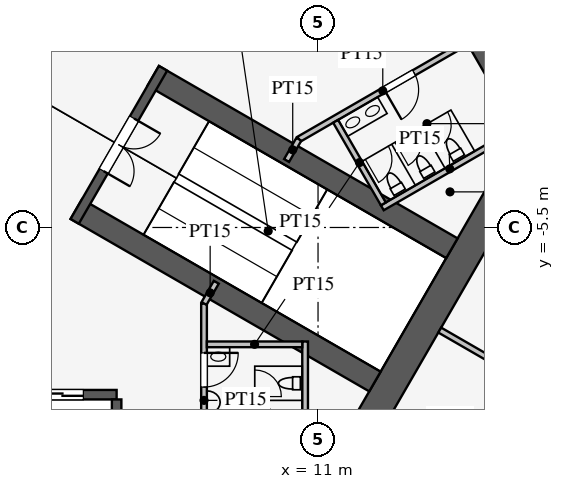
"""IFC4 building model, lengths in metres.
Left out: names, types, materials, properties, quantities, classifications, styles, units other than length and angle.
Written with IfcOpenShell. Run it as: python <this file> out.ifc"""

import sys

from ifc_helpers import new_model, si_unit, direction, frame, frame_2d, origin, place, context, subcontext, project, spatial, rectangle, extrude, element, fill, save


model = new_model("IFC4")
c1 = context("Model", 3, precision=1e-05, world=origin(), true_north=direction((0.0, 1.0)))
c2 = subcontext(c1, "Body", "Model", "MODEL_VIEW")
j1 = project(units=[si_unit("LENGTHUNIT", "METRE"), si_unit("PLANEANGLEUNIT", "RADIAN")], contexts=[c1])
p1 = place(None, origin())
s1 = spatial("IfcSite", under=j1, at=p1, CompositionType="ELEMENT")
p2 = place(p1, origin())
s2 = spatial("IfcBuilding", under=s1, at=p2, CompositionType="ELEMENT")
p3 = place(p2, frame((0.0, 0.0, 45.9)))
s3 = spatial("IfcBuildingStorey", under=s2, at=p3, CompositionType="ELEMENT", Elevation=45.9)
p4 = place(p3, frame((10.97, -13.0, 0.0), z_axis=(0.0, 0.0, 1.0), x_axis=(0.499995765644, 0.866027848477, 0.0)))
e1 = element("IfcWall", 1, at=p4, inside=s3, PredefinedType="SHEAR", context=c2, shape_type="SweptSolid", body=[
    extrude(rectangle(XDim=11.547, YDim=0.8, at=frame_2d((5.773, 0.0))), origin(), (0.0, 0.0, 1.0), 4.2),
])
p5 = place(p3, frame((16.743, -3.0, 0.0), z_axis=(0.0, 0.0, 1.0), x_axis=(-0.500002442456, 0.866023993627, 0.0)))
e2 = element("IfcWall", 2, at=p5, inside=s3, PredefinedType="SHEAR", context=c2, shape_type="SweptSolid", body=[
    extrude(rectangle(XDim=21.939, YDim=0.8, at=frame_2d((10.97, 0.0))), origin(), (0.0, 0.0, 1.0), 4.2),
])
p6 = place(p5, frame((17.27, 0.0, 0.0)))
e3 = element("IfcOpeningElement", 3, at=p6, cuts=e2, PredefinedType="OPENING", context=c2, shape_type="SweptSolid", body=[
    extrude(rectangle(XDim=1.2, YDim=2.1, at=frame_2d((0.6, 1.05))), frame((0.0, 0.41, 0.0), z_axis=(0.0, -1.0, 0.0), x_axis=(1.0, 0.0, 0.0)), (0.0, 0.0, 1.0), 0.82),
])
p7 = place(p5, frame((3.47, 0.0, 0.0)))
e4 = element("IfcOpeningElement", 4, at=p7, cuts=e2, PredefinedType="OPENING", context=c2, shape_type="SweptSolid", body=[
    extrude(rectangle(XDim=1.2, YDim=2.1, at=frame_2d((0.6, 1.05))), frame((0.0, 0.41, 0.0), z_axis=(0.0, -1.0, 0.0), x_axis=(1.0, 0.0, 0.0)), (0.0, 0.0, 1.0), 0.82),
])
p8 = place(p3, frame((-5.7, -9.9, 0.0), z_axis=(0.0, 0.0, 1.0), x_axis=(1.0, 0.0, 0.0)))
e5 = element("IfcWall", 5, at=p8, inside=s3, PredefinedType="SHEAR", context=c2, shape_type="SweptSolid", body=[
    extrude(rectangle(XDim=11.4, YDim=0.25, at=frame_2d((5.7, 0.0))), origin(), (0.0, 0.0, 1.0), 4.2),
])
p9 = place(p8, frame((0.875, 0.0, 0.0)))
e6 = element("IfcOpeningElement", 6, at=p9, cuts=e5, PredefinedType="OPENING", context=c2, shape_type="SweptSolid", body=[
    extrude(rectangle(XDim=1.1, YDim=2.2, at=frame_2d((0.55, 1.1))), frame((0.0, 0.135, 0.0), z_axis=(0.0, -1.0, 0.0), x_axis=(1.0, 0.0, 0.0)), (0.0, 0.0, 1.0), 0.27),
])
p10 = place(p8, frame((3.725, 0.0, 0.0)))
e7 = element("IfcOpeningElement", 7, at=p10, cuts=e5, PredefinedType="OPENING", context=c2, shape_type="SweptSolid", body=[
    extrude(rectangle(XDim=1.1, YDim=2.2, at=frame_2d((0.55, 1.1))), frame((0.0, 0.135, 0.0), z_axis=(0.0, -1.0, 0.0), x_axis=(1.0, 0.0, 0.0)), (0.0, 0.0, 1.0), 0.27),
])
p11 = place(p8, frame((6.575, 0.0, 0.0)))
e8 = element("IfcOpeningElement", 8, at=p11, cuts=e5, PredefinedType="OPENING", context=c2, shape_type="SweptSolid", body=[
    extrude(rectangle(XDim=1.1, YDim=2.2, at=frame_2d((0.55, 1.1))), frame((0.0, 0.135, 0.0), z_axis=(0.0, -1.0, 0.0), x_axis=(1.0, 0.0, 0.0)), (0.0, 0.0, 1.0), 0.27),
])
p12 = place(p8, frame((9.425, 0.0, 0.0)))
e9 = element("IfcOpeningElement", 9, at=p12, cuts=e5, PredefinedType="OPENING", context=c2, shape_type="SweptSolid", body=[
    extrude(rectangle(XDim=1.1, YDim=2.2, at=frame_2d((0.55, 1.1))), frame((0.0, 0.135, 0.0), z_axis=(0.0, -1.0, 0.0), x_axis=(1.0, 0.0, 0.0)), (0.0, 0.0, 1.0), 0.27),
])
p13 = place(p3, frame((5.7, -10.025, 0.0), z_axis=(0.0, 0.0, 1.0), x_axis=(0.0, -1.0, 0.0)))
e10 = element("IfcWall", 10, at=p13, inside=s3, PredefinedType="SHEAR", context=c2, shape_type="SweptSolid", body=[
    extrude(rectangle(XDim=2.575, YDim=0.25, at=frame_2d((1.288, 0.0))), origin(), (0.0, 0.0, 1.0), 4.2),
])
for number, where, z_axis, x_axis in (
    (11, (4.638, -5.016, 0.0), (0.0, 0.0, 1.0), (0.866, -0.5, 0.0)),
    (12, (6.663, -1.509, 0.0), (0.0, 0.0, 1.0), (0.866, -0.5, 0.0)),
):
    element("IfcWall", number, at=place(p3, frame(where, z_axis=z_axis, x_axis=x_axis)), inside=s3, PredefinedType="SHEAR", context=c2, shape_type="SweptSolid", body=[
        extrude(rectangle(XDim=9.075, YDim=0.6, at=frame_2d((4.538, 0.0))), origin(), (0.0, 0.0, 1.0), 4.2),
    ])
p14 = place(p3, frame((4.597, -5.339, 0.0), z_axis=(0.0, 0.0, 1.0), x_axis=(0.499984536904, 0.866034331223, 0.0)))
e13 = element("IfcWall", 13, at=p14, inside=s3, PredefinedType="SHEAR", context=c2, shape_type="SweptSolid", body=[
    extrude(rectangle(XDim=4.65, YDim=0.25, at=frame_2d((2.325, 0.0))), origin(), (0.0, 0.0, 1.0), 4.2),
])
p15 = place(p14, frame((1.525, 0.0, 0.0)))
e14 = element("IfcOpeningElement", 14, at=p15, cuts=e13, PredefinedType="OPENING", context=c2, shape_type="SweptSolid", body=[
    extrude(rectangle(XDim=1.6, YDim=2.1, at=frame_2d((0.8, 1.05))), frame((0.0, 0.135, 0.0), z_axis=(0.0, -1.0, 0.0), x_axis=(1.0, 0.0, 0.0)), (0.0, 0.0, 1.0), 0.27),
])
p16 = place(p3, frame((8.0, -7.5, 0.0), z_axis=(0.0, 0.0, 1.0), x_axis=(0.0, -1.0, 0.0)))
e15 = element("IfcWall", 15, at=p16, inside=s3, PredefinedType="PARTITIONING", context=c2, shape_type="SweptSolid", body=[
    extrude(rectangle(XDim=5.1, YDim=0.15, at=frame_2d((2.55, 0.0))), origin(), (0.0, 0.0, 1.0), 4.0),
])
p17 = place(p16, frame((1.3, 0.0, 0.0)))
e16 = element("IfcOpeningElement", 16, at=p17, cuts=e15, PredefinedType="OPENING", context=c2, shape_type="SweptSolid", body=[
    extrude(rectangle(XDim=0.9, YDim=2.1, at=frame_2d((0.45, 1.05))), frame((0.0, 0.085, 0.0), z_axis=(0.0, -1.0, 0.0), x_axis=(1.0, 0.0, 0.0)), (0.0, 0.0, 1.0), 0.17),
])
p18 = place(p3, frame((10.495, -3.178, 0.0), z_axis=(0.0, 0.0, 1.0), x_axis=(0.86602216432, 0.500005610874, 0.0)))
e17 = element("IfcWall", 17, at=p18, inside=s3, PredefinedType="PARTITIONING", context=c2, shape_type="SweptSolid", body=[
    extrude(rectangle(XDim=5.1, YDim=0.15, at=frame_2d((2.55, 0.0))), origin(), (0.0, 0.0, 1.0), 4.0),
])
p19 = place(p18, frame((2.6, 0.0, 0.0)))
e18 = element("IfcOpeningElement", 18, at=p19, cuts=e17, PredefinedType="OPENING", context=c2, shape_type="SweptSolid", body=[
    extrude(rectangle(XDim=0.9, YDim=2.1, at=frame_2d((0.45, 1.05))), frame((0.0, 0.085, 0.0), z_axis=(0.0, -1.0, 0.0), x_axis=(1.0, 0.0, 0.0)), (0.0, 0.0, 1.0), 0.17),
])
for number, where, z_axis, x_axis in (
    (19, (8.0, -7.5, 0.0), (0.0, 0.0, 1.0), (0.5, 0.866, 0.0)),
    (20, (10.495, -3.178, 0.0), (0.0, 0.0, 1.0), (-0.5, -0.866, 0.0)),
):
    element("IfcWall", number, at=place(p3, frame(where, z_axis=z_axis, x_axis=x_axis)), inside=s3, PredefinedType="PARTITIONING", context=c2, shape_type="SweptSolid", body=[
        extrude(rectangle(XDim=0.645, YDim=0.15, at=frame_2d((0.323, 0.0))), origin(), (0.0, 0.0, 1.0), 4.0),
    ])
p20 = place(p3, frame((10.66, -8.5, 0.0), z_axis=(0.0, 0.0, 1.0), x_axis=(0.0, -1.0, 0.0)))
e21 = element("IfcWall", 21, at=p20, inside=s3, PredefinedType="PARTITIONING", context=c2, shape_type="SweptSolid", body=[
    extrude(rectangle(XDim=4.1, YDim=0.15, at=frame_2d((2.05, 0.0))), origin(), (0.0, 0.0, 1.0), 4.0),
])
p21 = place(p3, frame((8.075, -8.575, 0.0), z_axis=(0.0, 0.0, 1.0), x_axis=(1.0, 0.0, 0.0)))
e22 = element("IfcWall", 22, at=p21, inside=s3, PredefinedType="PARTITIONING", context=c2, shape_type="SweptSolid", body=[
    extrude(rectangle(XDim=2.51, YDim=0.15, at=frame_2d((1.255, 0.0))), origin(), (0.0, 0.0, 1.0), 4.0),
])
p22 = place(p3, frame((12.691, -4.982, 0.0), z_axis=(0.0, 0.0, 1.0), x_axis=(0.8660249478, 0.500000789788, 0.0)))
e23 = element("IfcWall", 23, at=p22, inside=s3, PredefinedType="PARTITIONING", context=c2, shape_type="SweptSolid", body=[
    extrude(rectangle(XDim=4.1, YDim=0.15, at=frame_2d((2.05, 0.0))), origin(), (0.0, 0.0, 1.0), 4.0),
])
p23 = place(p3, frame((11.464, -2.706, 0.0), z_axis=(0.0, 0.0, 1.0), x_axis=(0.50001992892, -0.866013897511, 0.0)))
e24 = element("IfcWall", 24, at=p23, inside=s3, PredefinedType="PARTITIONING", context=c2, shape_type="SweptSolid", body=[
    extrude(rectangle(XDim=2.51, YDim=0.15, at=frame_2d((1.255, 0.0))), origin(), (0.0, 0.0, 1.0), 4.0),
])
p24 = place(p3, frame((14.203, -8.2, 0.0), z_axis=(0.0, 0.0, 1.0), x_axis=(0.866024965723, -0.500000758745, 0.0)))
e25 = element("IfcWall", 25, at=p24, inside=s3, PredefinedType="PARTITIONING", context=c2, shape_type="SweptSolid", body=[
    extrude(rectangle(XDim=18.25, YDim=0.15, at=frame_2d((9.125, 0.0))), origin(), (0.0, 0.0, 1.0), 2.3),
])
p25 = place(p17, origin())
e26 = element("IfcDoor", 26, at=p25, inside=s3, OperationType="SINGLE_SWING_LEFT", PredefinedType="DOOR", context=c2, shape_type="SweptSolid", body=[
    extrude(rectangle(XDim=0.9, YDim=2.1, at=frame_2d((0.45, 1.05))), frame((0.0, 0.025, 0.0), z_axis=(0.0, -1.0, 0.0), x_axis=(1.0, 0.0, 0.0)), (0.0, 0.0, 1.0), 0.05),
])
fill(e16, e26)
p26 = place(p19, frame((0.9, 0.0, 0.0), z_axis=(0.0, 0.0, 1.0), x_axis=(-1.0, 0.0, 0.0)))
e27 = element("IfcDoor", 27, at=p26, inside=s3, OperationType="SINGLE_SWING_RIGHT", PredefinedType="DOOR", context=c2, shape_type="SweptSolid", body=[
    extrude(rectangle(XDim=0.9, YDim=2.1, at=frame_2d((0.45, 1.05))), frame((0.0, 0.025, 0.0), z_axis=(0.0, -1.0, 0.0), x_axis=(1.0, 0.0, 0.0)), (0.0, 0.0, 1.0), 0.05),
])
fill(e18, e27)
p27 = place(p15, frame((1.6, 0.0, 0.0), z_axis=(0.0, 0.0, 1.0), x_axis=(-1.0, 0.0, 0.0)))
e28 = element("IfcDoor", 28, at=p27, inside=s3, OperationType="DOUBLE_DOOR_SINGLE_SWING", PredefinedType="DOOR", context=c2, shape_type="SweptSolid", body=[
    extrude(rectangle(XDim=1.6, YDim=2.1, at=frame_2d((0.8, 1.05))), frame((0.0, 0.025, 0.0), z_axis=(0.0, -1.0, 0.0), x_axis=(1.0, 0.0, 0.0)), (0.0, 0.0, 1.0), 0.05),
])
fill(e14, e28)
p28 = place(p12, origin())
e29 = element("IfcDoor", 29, at=p28, inside=s3, OperationType="DOUBLE_DOOR_SLIDING", PredefinedType="DOOR", context=c2, shape_type="SweptSolid", body=[
    extrude(rectangle(XDim=1.1, YDim=2.2, at=frame_2d((0.55, 1.1))), frame((0.0, 0.025, 0.0), z_axis=(0.0, -1.0, 0.0), x_axis=(1.0, 0.0, 0.0)), (0.0, 0.0, 1.0), 0.05),
])
fill(e9, e29)
save(model, sys.argv[1])
